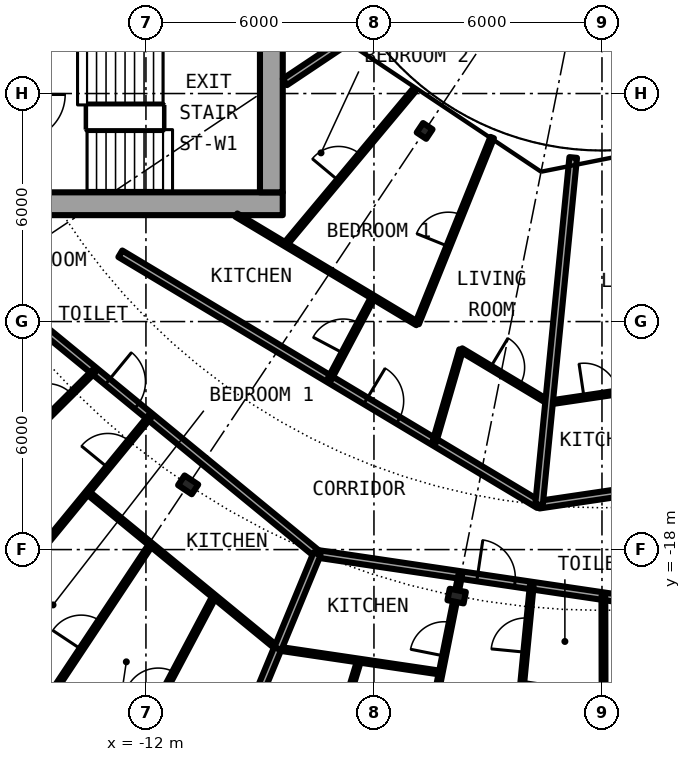
"""IFC4 building model, lengths in metres.
Left out: names, types, materials, properties, quantities, classifications, styles, units other than length and angle.
Written with IfcOpenShell. Run it as: python <this file> out.ifc"""

import sys

from ifc_helpers import new_model, si_unit, direction, frame, frame_2d, origin, origin_2d, place, context, subcontext, project, spatial, rectangle, i_section, extrude, element, fill, save


model = new_model("IFC4")
c1 = context("Model", 3, precision=1e-05, world=origin(), true_north=direction((0.0, 1.0)))
c2 = subcontext(c1, "Body", "Model", "MODEL_VIEW")
j1 = project(units=[si_unit("LENGTHUNIT", "METRE"), si_unit("PLANEANGLEUNIT", "RADIAN")], contexts=[c1])
p1 = place(None, origin())
s1 = spatial("IfcSite", under=j1, at=p1, CompositionType="ELEMENT")
p2 = place(p1, origin())
s2 = spatial("IfcBuilding", under=s1, at=p2, CompositionType="ELEMENT")
p3 = place(p2, frame((0.0, 0.0, 129.95)))
s3 = spatial("IfcBuildingStorey", under=s2, at=p3, CompositionType="ELEMENT", Elevation=129.95)
for number, where, z_axis, x_axis in (
    (1, (-10.889, -16.297, 0.0), (0.0, 0.0, 1.0), (-0.556, -0.831, 0.0)),
    (2, (-3.824, -19.223, 0.0), (0.0, 0.0, 1.0), (-0.195, -0.981, 0.0)),
):
    element("IfcColumn", number, at=place(p3, frame(where, z_axis=z_axis, x_axis=x_axis)), inside=s3, PredefinedType="COLUMN", context=c2, shape_type="SweptSolid", body=[
        extrude(i_section(OverallWidth=0.307, OverallDepth=0.432, WebThickness=0.021, FlangeThickness=0.04, FilletRadius=0.027, at=origin_2d()), origin(), (0.0, 0.0, 1.0), 3.05),
    ])
p4 = place(p3, frame((-4.667, -6.984, 0.0), z_axis=(0.0, 0.0, 1.0), x_axis=(-0.55557023302, -0.831469612303, 0.0)))
e3 = element("IfcColumn", 3, at=p4, inside=s3, PredefinedType="COLUMN", context=c2, shape_type="SweptSolid", body=[
    extrude(i_section(OverallWidth=0.3, OverallDepth=0.3, WebThickness=0.011, FlangeThickness=0.019, FilletRadius=0.027, at=origin_2d()), origin(), (0.0, 0.0, 1.0), 3.05),
])
p5 = place(p3, frame((-22.2, -8.9, 0.0), z_axis=(0.0, 0.0, 1.0), x_axis=(1.0, 0.0, 0.0)))
e4 = element("IfcWall", 4, at=p5, inside=s3, PredefinedType="SHEAR", context=c2, shape_type="SweptSolid", body=[
    extrude(rectangle(XDim=13.8, YDim=0.6, at=frame_2d((6.9, 0.0))), origin(), (0.0, 0.0, 1.0), 3.05),
])
p6 = place(p5, frame((1.125, 0.0, 0.0)))
e5 = element("IfcOpeningElement", 5, at=p6, cuts=e4, PredefinedType="OPENING", context=c2, shape_type="SweptSolid", body=[
    extrude(rectangle(XDim=1.2, YDim=2.3, at=frame_2d((0.6, 1.15))), frame((0.0, 0.31, 0.0), z_axis=(0.0, -1.0, 0.0), x_axis=(1.0, 0.0, 0.0)), (0.0, 0.0, 1.0), 0.62),
])
p7 = place(p3, frame((-8.7, 8.6, 0.0), z_axis=(0.0, 0.0, 1.0), x_axis=(0.0, -1.0, 0.0)))
e6 = element("IfcWall", 6, at=p7, inside=s3, PredefinedType="SHEAR", context=c2, shape_type="SweptSolid", body=[
    extrude(rectangle(XDim=17.2, YDim=0.6, at=frame_2d((8.6, 0.0))), origin(), (0.0, 0.0, 1.0), 3.05),
])
p8 = place(p7, frame((7.4, 0.0, 0.1)))
e7 = element("IfcOpeningElement", 7, at=p8, cuts=e6, PredefinedType="OPENING", context=c2, shape_type="SweptSolid", body=[
    extrude(rectangle(XDim=2.4, YDim=2.2, at=frame_2d((1.2, 1.1))), frame((0.0, 0.31, 0.0), z_axis=(0.0, -1.0, 0.0), x_axis=(1.0, 0.0, 0.0)), (0.0, 0.0, 1.0), 0.62),
])
p9 = place(p3, frame((-8.534, -20.603, 0.0), z_axis=(0.0, 0.0, 1.0), x_axis=(0.989178348771, -0.146718077695, 0.0)))
e8 = element("IfcWall", 8, at=p9, inside=s3, PredefinedType="PARTITIONING", context=c2, shape_type="SweptSolid", body=[
    extrude(rectangle(XDim=4.335, YDim=0.1, at=frame_2d((2.167, 0.0))), origin(), (0.0, 0.0, 1.0), 2.7),
])
p10 = place(p3, frame((-13.538, -16.496, 0.0), z_axis=(0.0, 0.0, 1.0), x_axis=(0.773000340237, -0.634405606843, 0.0)))
e9 = element("IfcWall", 9, at=p10, inside=s3, PredefinedType="PARTITIONING", context=c2, shape_type="SweptSolid", body=[
    extrude(rectangle(XDim=6.474, YDim=0.1, at=frame_2d((3.237, 0.0))), origin(), (0.0, 0.0, 1.0), 2.7),
])
p11 = place(p3, frame((-7.495, -18.111, 0.0), z_axis=(0.0, 0.0, 1.0), x_axis=(0.989215286911, -0.146468823102, 0.0)))
e10 = element("IfcWall", 10, at=p11, inside=s3, PredefinedType="PARTITIONING", context=c2, shape_type="SweptSolid", body=[
    extrude(rectangle(XDim=9.531, YDim=0.2, at=frame_2d((4.766, 0.0))), origin(), (0.0, 0.0, 1.0), 2.39),
])
p12 = place(p11, frame((4.26, 0.0, 0.0)))
e11 = element("IfcOpeningElement", 11, at=p12, cuts=e10, PredefinedType="OPENING", context=c2, shape_type="SweptSolid", body=[
    extrude(rectangle(XDim=1.0, YDim=2.3, at=frame_2d((0.5, 1.15))), frame((0.0, 0.11, 0.0), z_axis=(0.0, -1.0, 0.0), x_axis=(1.0, 0.0, 0.0)), (0.0, 0.0, 1.0), 0.22),
])
p13 = place(p3, frame((-16.173, -10.991, 0.0), z_axis=(0.0, 0.0, 1.0), x_axis=(0.773013989296, -0.634388975591, 0.0)))
e12 = element("IfcWall", 12, at=p13, inside=s3, PredefinedType="PARTITIONING", context=c2, shape_type="SweptSolid", body=[
    extrude(rectangle(XDim=11.219, YDim=0.2, at=frame_2d((5.609, 0.0))), origin(), (0.0, 0.0, 1.0), 2.39),
])
p14 = place(p13, frame((4.089, 0.0, 0.0)))
e13 = element("IfcOpeningElement", 13, at=p14, cuts=e12, PredefinedType="OPENING", context=c2, shape_type="SweptSolid", body=[
    extrude(rectangle(XDim=1.0, YDim=2.3, at=frame_2d((0.5, 1.15))), frame((0.0, 0.11, 0.0), z_axis=(0.0, -1.0, 0.0), x_axis=(1.0, 0.0, 0.0)), (0.0, 0.0, 1.0), 0.22),
])
p15 = place(p3, frame((-1.658, -16.819, 0.0), z_axis=(0.0, 0.0, 1.0), x_axis=(0.989191327347, 0.146630549004, 0.0)))
e14 = element("IfcWall", 14, at=p15, inside=s3, PredefinedType="PARTITIONING", context=c2, shape_type="SweptSolid", body=[
    extrude(rectangle(XDim=8.212, YDim=0.2, at=frame_2d((4.106, 0.0))), origin(), (0.0, 0.0, 1.0), 2.7),
])
p16 = place(p15, frame((3.607, 0.0, 0.0)))
e15 = element("IfcOpeningElement", 15, at=p16, cuts=e14, PredefinedType="OPENING", context=c2, shape_type="SweptSolid", body=[
    extrude(rectangle(XDim=1.0, YDim=2.3, at=frame_2d((0.5, 1.15))), frame((0.0, 0.11, 0.0), z_axis=(0.0, -1.0, 0.0), x_axis=(1.0, 0.0, 0.0)), (0.0, 0.0, 1.0), 0.22),
])
p17 = place(p3, frame((-12.674, -10.216, 0.0), z_axis=(0.0, 0.0, 1.0), x_axis=(0.857761135463, -0.514048474844, 0.0)))
e16 = element("IfcWall", 16, at=p17, inside=s3, PredefinedType="PARTITIONING", context=c2, shape_type="SweptSolid", body=[
    extrude(rectangle(XDim=12.845, YDim=0.2, at=frame_2d((6.423, 0.0))), origin(), (0.0, 0.0, 1.0), 2.7),
])
p18 = place(p17, frame((7.527, 0.0, 0.0)))
e17 = element("IfcOpeningElement", 17, at=p18, cuts=e16, PredefinedType="OPENING", context=c2, shape_type="SweptSolid", body=[
    extrude(rectangle(XDim=1.0, YDim=2.3, at=frame_2d((0.5, 1.15))), frame((0.0, 0.11, 0.0), z_axis=(0.0, -1.0, 0.0), x_axis=(1.0, 0.0, 0.0)), (0.0, 0.0, 1.0), 0.22),
])
p19 = place(p3, frame((-1.392, -14.132, 0.0), z_axis=(0.0, 0.0, 1.0), x_axis=(0.989182088026, 0.146692865293, 0.0)))
e18 = element("IfcWall", 18, at=p19, inside=s3, PredefinedType="PARTITIONING", context=c2, shape_type="SweptSolid", body=[
    extrude(rectangle(XDim=2.761, YDim=0.1, at=frame_2d((1.38, 0.0))), origin(), (0.0, 0.0, 1.0), 2.7),
])
p20 = place(p19, frame((0.93, 0.0, 0.0)))
e19 = element("IfcOpeningElement", 19, at=p20, cuts=e18, PredefinedType="OPENING", context=c2, shape_type="SweptSolid", body=[
    extrude(rectangle(XDim=0.9, YDim=2.3, at=frame_2d((0.45, 1.15))), frame((0.0, 0.06, 0.0), z_axis=(0.0, -1.0, 0.0), x_axis=(1.0, 0.0, 0.0)), (0.0, 0.0, 1.0), 0.12),
])
p21 = place(p3, frame((-9.621, -9.199, 0.0), z_axis=(0.0, 0.0, 1.0), x_axis=(0.857698539053, -0.514152911211, 0.0)))
e20 = element("IfcWall", 20, at=p21, inside=s3, PredefinedType="PARTITIONING", context=c2, shape_type="SweptSolid", body=[
    extrude(rectangle(XDim=5.551, YDim=0.1, at=frame_2d((2.775, 0.0))), origin(), (0.0, 0.0, 1.0), 2.7),
])
p22 = place(p3, frame((-3.702, -12.747, 0.0), z_axis=(0.0, 0.0, 1.0), x_axis=(0.85772440305, -0.514109763001, 0.0)))
e21 = element("IfcWall", 21, at=p22, inside=s3, PredefinedType="PARTITIONING", context=c2, shape_type="SweptSolid", body=[
    extrude(rectangle(XDim=2.698, YDim=0.1, at=frame_2d((1.349, 0.0))), origin(), (0.0, 0.0, 1.0), 2.7),
])
p23 = place(p22, frame((0.894, 0.0, 0.0)))
e22 = element("IfcOpeningElement", 22, at=p23, cuts=e21, PredefinedType="OPENING", context=c2, shape_type="SweptSolid", body=[
    extrude(rectangle(XDim=0.9, YDim=2.3, at=frame_2d((0.45, 1.15))), frame((0.0, 0.06, 0.0), z_axis=(0.0, -1.0, 0.0), x_axis=(1.0, 0.0, 0.0)), (0.0, 0.0, 1.0), 0.12),
])
p24 = place(p3, frame((-6.513, -4.472, 0.0), z_axis=(0.0, 0.0, 1.0), x_axis=(-0.831333375071, -0.555774072347, 0.0)))
e23 = element("IfcWall", 23, at=p24, inside=s3, PredefinedType="PARTITIONING", context=c2, shape_type="SweptSolid", body=[
    extrude(rectangle(XDim=2.203, YDim=0.2, at=frame_2d((1.101, 0.0))), origin(), (0.0, 0.0, 1.0), 2.7),
])
p25 = place(p3, frame((-17.24, -21.007, 0.0), z_axis=(0.0, 0.0, 1.0), x_axis=(0.634396151441, 0.77300810024, 0.0)))
e24 = element("IfcWall", 24, at=p25, inside=s3, PredefinedType="PARTITIONING", context=c2, shape_type="SweptSolid", body=[
    extrude(rectangle(XDim=8.419, YDim=0.1, at=frame_2d((4.209, 0.0))), origin(), (0.0, 0.0, 1.0), 2.7),
])
p26 = place(p25, frame((6.679, 0.0, 0.0)))
e25 = element("IfcOpeningElement", 25, at=p26, cuts=e24, PredefinedType="OPENING", context=c2, shape_type="SweptSolid", body=[
    extrude(rectangle(XDim=0.9, YDim=2.3, at=frame_2d((0.45, 1.15))), frame((0.0, 0.06, 0.0), z_axis=(0.0, -1.0, 0.0), x_axis=(1.0, 0.0, 0.0)), (0.0, 0.0, 1.0), 0.12),
])
p27 = place(p25, frame((2.468, 0.0, 0.0)))
e26 = element("IfcOpeningElement", 26, at=p27, cuts=e24, PredefinedType="OPENING", context=c2, shape_type="SweptSolid", body=[
    extrude(rectangle(XDim=0.9, YDim=2.3, at=frame_2d((0.45, 1.15))), frame((0.0, 0.06, 0.0), z_axis=(0.0, -1.0, 0.0), x_axis=(1.0, 0.0, 0.0)), (0.0, 0.0, 1.0), 0.12),
])
p28 = place(p3, frame((-15.202, -15.131, 0.0), z_axis=(0.0, 0.0, 1.0), x_axis=(0.708796844581, 0.705412668665, 0.0)))
e27 = element("IfcWall", 27, at=p28, inside=s3, PredefinedType="PARTITIONING", context=c2, shape_type="SweptSolid", body=[
    extrude(rectangle(XDim=2.597, YDim=0.1, at=frame_2d((1.299, 0.0))), origin(), (0.0, 0.0, 1.0), 2.7),
])
p29 = place(p28, frame((0.849, 0.0, 0.0)))
e28 = element("IfcOpeningElement", 28, at=p29, cuts=e27, PredefinedType="OPENING", context=c2, shape_type="SweptSolid", body=[
    extrude(rectangle(XDim=0.9, YDim=2.3, at=frame_2d((0.45, 1.15))), frame((0.0, 0.06, 0.0), z_axis=(0.0, -1.0, 0.0), x_axis=(1.0, 0.0, 0.0)), (0.0, 0.0, 1.0), 0.12),
])
p30 = place(p3, frame((-15.039, -22.634, 0.0), z_axis=(0.0, 0.0, 1.0), x_axis=(0.553440102418, 0.832888980018, 0.0)))
e29 = element("IfcWall", 29, at=p30, inside=s3, PredefinedType="PARTITIONING", context=c2, shape_type="SweptSolid", body=[
    extrude(rectangle(XDim=5.726, YDim=0.1, at=frame_2d((2.863, 0.0))), origin(), (0.0, 0.0, 1.0), 2.7),
])
p31 = place(p30, frame((2.413, 0.0, 0.0)))
e30 = element("IfcOpeningElement", 30, at=p31, cuts=e29, PredefinedType="OPENING", context=c2, shape_type="SweptSolid", body=[
    extrude(rectangle(XDim=0.9, YDim=2.3, at=frame_2d((0.45, 1.15))), frame((0.0, 0.06, 0.0), z_axis=(0.0, -1.0, 0.0), x_axis=(1.0, 0.0, 0.0)), (0.0, 0.0, 1.0), 0.12),
])
p32 = place(p3, frame((-12.734, -24.007, 0.0), z_axis=(0.0, 0.0, 1.0), x_axis=(0.468610030042, 0.883405139075, 0.0)))
e31 = element("IfcWall", 31, at=p32, inside=s3, PredefinedType="PARTITIONING", context=c2, shape_type="SweptSolid", body=[
    extrude(rectangle(XDim=5.403, YDim=0.1, at=frame_2d((2.702, 0.0))), origin(), (0.0, 0.0, 1.0), 2.7),
])
p33 = place(p32, frame((2.252, 0.0, 0.0)))
e32 = element("IfcOpeningElement", 32, at=p33, cuts=e31, PredefinedType="OPENING", context=c2, shape_type="SweptSolid", body=[
    extrude(rectangle(XDim=0.9, YDim=2.3, at=frame_2d((0.45, 1.15))), frame((0.0, 0.06, 0.0), z_axis=(0.0, -1.0, 0.0), x_axis=(1.0, 0.0, 0.0)), (0.0, 0.0, 1.0), 0.12),
])
p34 = place(p3, frame((-10.399, -25.106, 0.0), z_axis=(0.0, 0.0, 1.0), x_axis=(0.382651153718, 0.923892902104, 0.0)))
e33 = element("IfcWall", 33, at=p34, inside=s3, PredefinedType="PARTITIONING", context=c2, shape_type="SweptSolid", body=[
    extrude(rectangle(XDim=4.874, YDim=0.2, at=frame_2d((2.437, 0.0))), origin(), (0.0, 0.0, 1.0), 2.7),
])
p35 = place(p3, frame((-8.529, -20.605, 0.0), z_axis=(0.0, 0.0, 1.0), x_axis=(0.382540781694, 0.923938607452, 0.0)))
e34 = element("IfcWall", 34, at=p35, inside=s3, PredefinedType="PARTITIONING", context=c2, shape_type="SweptSolid", body=[
    extrude(rectangle(XDim=2.7, YDim=0.2, at=frame_2d((1.35, 0.0))), origin(), (0.0, 0.0, 1.0), 2.7),
])
p36 = place(p3, frame((-8.335, -9.97, 0.0), z_axis=(0.0, 0.0, 1.0), x_axis=(0.641376424834, 0.767226356213, 0.0)))
e35 = element("IfcWall", 35, at=p36, inside=s3, PredefinedType="PARTITIONING", context=c2, shape_type="SweptSolid", body=[
    extrude(rectangle(XDim=5.275, YDim=0.1, at=frame_2d((2.637, 0.0))), origin(), (0.0, 0.0, 1.0), 2.7),
])
p37 = place(p36, frame((2.187, 0.0, 0.0)))
e36 = element("IfcOpeningElement", 36, at=p37, cuts=e35, PredefinedType="OPENING", context=c2, shape_type="SweptSolid", body=[
    extrude(rectangle(XDim=0.9, YDim=2.3, at=frame_2d((0.45, 1.15))), frame((0.0, 0.06, 0.0), z_axis=(0.0, -1.0, 0.0), x_axis=(1.0, 0.0, 0.0)), (0.0, 0.0, 1.0), 0.12),
])
p38 = place(p3, frame((-7.938, -25.99, 0.0), z_axis=(0.0, 0.0, 1.0), x_axis=(0.292081613207, 0.956393397732, 0.0)))
e37 = element("IfcWall", 37, at=p38, inside=s3, PredefinedType="PARTITIONING", context=c2, shape_type="SweptSolid", body=[
    extrude(rectangle(XDim=5.3, YDim=0.1, at=frame_2d((2.65, 0.0))), origin(), (0.0, 0.0, 1.0), 2.7),
])
p39 = place(p38, frame((2.2, 0.0, 0.0)))
e38 = element("IfcOpeningElement", 38, at=p39, cuts=e37, PredefinedType="OPENING", context=c2, shape_type="SweptSolid", body=[
    extrude(rectangle(XDim=0.9, YDim=2.3, at=frame_2d((0.45, 1.15))), frame((0.0, 0.06, 0.0), z_axis=(0.0, -1.0, 0.0), x_axis=(1.0, 0.0, 0.0)), (0.0, 0.0, 1.0), 0.12),
])
p40 = place(p3, frame((-7.169, -13.516, 0.0), z_axis=(0.0, 0.0, 1.0), x_axis=(0.468649029236, 0.883384450506, 0.0)))
e39 = element("IfcWall", 39, at=p40, inside=s3, PredefinedType="PARTITIONING", context=c2, shape_type="SweptSolid", body=[
    extrude(rectangle(XDim=2.445, YDim=0.1, at=frame_2d((1.223, 0.0))), origin(), (0.0, 0.0, 1.0), 2.7),
])
p41 = place(p40, frame((0.773, 0.0, 0.0)))
e40 = element("IfcOpeningElement", 40, at=p41, cuts=e39, PredefinedType="OPENING", context=c2, shape_type="SweptSolid", body=[
    extrude(rectangle(XDim=0.9, YDim=2.3, at=frame_2d((0.45, 1.15))), frame((0.0, 0.06, 0.0), z_axis=(0.0, -1.0, 0.0), x_axis=(1.0, 0.0, 0.0)), (0.0, 0.0, 1.0), 0.12),
])
p42 = place(p3, frame((-5.324, -26.649, 0.0), z_axis=(0.0, 0.0, 1.0), x_axis=(0.195918370415, 0.980620207896, 0.0)))
e41 = element("IfcWall", 41, at=p42, inside=s3, PredefinedType="PARTITIONING", context=c2, shape_type="SweptSolid", body=[
    extrude(rectangle(XDim=7.36, YDim=0.1, at=frame_2d((3.68, 0.0))), origin(), (0.0, 0.0, 1.0), 2.7),
])
p43 = place(p42, frame((5.966, 0.0, 0.0)))
e42 = element("IfcOpeningElement", 42, at=p43, cuts=e41, PredefinedType="OPENING", context=c2, shape_type="SweptSolid", body=[
    extrude(rectangle(XDim=0.9, YDim=2.3, at=frame_2d((0.45, 1.15))), frame((0.0, 0.06, 0.0), z_axis=(0.0, -1.0, 0.0), x_axis=(1.0, 0.0, 0.0)), (0.0, 0.0, 1.0), 0.12),
])
p44 = place(p42, frame((2.308, 0.0, 0.0)))
e43 = element("IfcOpeningElement", 43, at=p44, cuts=e41, PredefinedType="OPENING", context=c2, shape_type="SweptSolid", body=[
    extrude(rectangle(XDim=0.9, YDim=2.3, at=frame_2d((0.45, 1.15))), frame((0.0, 0.06, 0.0), z_axis=(0.0, -1.0, 0.0), x_axis=(1.0, 0.0, 0.0)), (0.0, 0.0, 1.0), 0.12),
])
p45 = place(p3, frame((-4.864, -12.051, 0.0), z_axis=(0.0, 0.0, 1.0), x_axis=(0.374372761824, 0.927278294367, 0.0)))
e44 = element("IfcWall", 44, at=p45, inside=s3, PredefinedType="PARTITIONING", context=c2, shape_type="SweptSolid", body=[
    extrude(rectangle(XDim=5.276, YDim=0.1, at=frame_2d((2.638, 0.0))), origin(), (0.0, 0.0, 1.0), 2.7),
])
p46 = place(p45, frame((2.188, 0.0, 0.0)))
e45 = element("IfcOpeningElement", 45, at=p46, cuts=e44, PredefinedType="OPENING", context=c2, shape_type="SweptSolid", body=[
    extrude(rectangle(XDim=0.9, YDim=2.3, at=frame_2d((0.45, 1.15))), frame((0.0, 0.06, 0.0), z_axis=(0.0, -1.0, 0.0), x_axis=(1.0, 0.0, 0.0)), (0.0, 0.0, 1.0), 0.12),
])
p47 = place(p3, frame((-4.411, -15.168, 0.0), z_axis=(0.0, 0.0, 1.0), x_axis=(0.279201466266, 0.960232545395, 0.0)))
e46 = element("IfcWall", 46, at=p47, inside=s3, PredefinedType="PARTITIONING", context=c2, shape_type="SweptSolid", body=[
    extrude(rectangle(XDim=2.524, YDim=0.1, at=frame_2d((1.262, 0.0))), origin(), (0.0, 0.0, 1.0), 2.7),
])
p48 = place(p3, frame((-3.797, -19.008, 0.0), z_axis=(0.0, 0.0, 1.0), x_axis=(0.196386856719, 0.980526492507, 0.0)))
e47 = element("IfcWall", 47, at=p48, inside=s3, PredefinedType="PARTITIONING", context=c2, shape_type="SweptSolid", body=[
    extrude(rectangle(XDim=0.347, YDim=0.1, at=frame_2d((0.173, 0.0))), origin(), (0.0, 0.0, 1.0), 2.7),
])
p49 = place(p3, frame((-2.102, -21.557, 0.0), z_axis=(0.0, 0.0, 1.0), x_axis=(0.096922256818, 0.995291955224, 0.0)))
e48 = element("IfcWall", 48, at=p49, inside=s3, PredefinedType="PARTITIONING", context=c2, shape_type="SweptSolid", body=[
    extrude(rectangle(XDim=2.622, YDim=0.1, at=frame_2d((1.311, 0.0))), origin(), (0.0, 0.0, 1.0), 2.7),
])
p50 = place(p49, frame((0.861, 0.0, 0.0)))
e49 = element("IfcOpeningElement", 49, at=p50, cuts=e48, PredefinedType="OPENING", context=c2, shape_type="SweptSolid", body=[
    extrude(rectangle(XDim=0.9, YDim=2.3, at=frame_2d((0.45, 1.15))), frame((0.0, 0.06, 0.0), z_axis=(0.0, -1.0, 0.0), x_axis=(1.0, 0.0, 0.0)), (0.0, 0.0, 1.0), 0.12),
])
p51 = place(p3, frame((-1.657, -16.819, 0.0), z_axis=(0.0, 0.0, 1.0), x_axis=(0.098026443043, 0.995183810391, 0.0)))
e50 = element("IfcWall", 50, at=p51, inside=s3, PredefinedType="PARTITIONING", context=c2, shape_type="SweptSolid", body=[
    extrude(rectangle(XDim=9.18, YDim=0.2, at=frame_2d((4.59, 0.0))), origin(), (0.0, 0.0, 1.0), 2.7),
])
p52 = place(p3, frame((0.042, -21.875, 0.0), z_axis=(0.0, 0.0, 1.0), x_axis=(-0.001843314841, 0.999998301094, 0.0)))
e51 = element("IfcWall", 51, at=p52, inside=s3, PredefinedType="PARTITIONING", context=c2, shape_type="SweptSolid", body=[
    extrude(rectangle(XDim=2.649, YDim=0.1, at=frame_2d((1.324, 0.0))), origin(), (0.0, 0.0, 1.0), 2.7),
])
p53 = place(p14, origin())
e52 = element("IfcDoor", 52, at=p53, inside=s3, OperationType="SINGLE_SWING_LEFT", PredefinedType="DOOR", context=c2, shape_type="SweptSolid", body=[
    extrude(rectangle(XDim=1.0, YDim=2.3, at=frame_2d((0.5, 1.15))), frame((0.0, 0.025, 0.0), z_axis=(0.0, -1.0, 0.0), x_axis=(1.0, 0.0, 0.0)), (0.0, 0.0, 1.0), 0.05),
])
fill(e13, e52)
p54 = place(p29, origin())
e53 = element("IfcDoor", 53, at=p54, inside=s3, OperationType="SINGLE_SWING_LEFT", PredefinedType="DOOR", context=c2, shape_type="SweptSolid", body=[
    extrude(rectangle(XDim=0.9, YDim=2.3, at=frame_2d((0.45, 1.15))), frame((0.0, 0.025, 0.0), z_axis=(0.0, -1.0, 0.0), x_axis=(1.0, 0.0, 0.0)), (0.0, 0.0, 1.0), 0.05),
])
fill(e28, e53)
p55 = place(p26, origin())
e54 = element("IfcDoor", 54, at=p55, inside=s3, OperationType="SINGLE_SWING_RIGHT", PredefinedType="DOOR", context=c2, shape_type="SweptSolid", body=[
    extrude(rectangle(XDim=0.9, YDim=2.3, at=frame_2d((0.45, 1.15))), frame((0.0, 0.025, 0.0), z_axis=(0.0, -1.0, 0.0), x_axis=(1.0, 0.0, 0.0)), (0.0, 0.0, 1.0), 0.05),
])
fill(e25, e54)
p56 = place(p31, origin())
e55 = element("IfcDoor", 55, at=p56, inside=s3, OperationType="SINGLE_SWING_RIGHT", PredefinedType="DOOR", context=c2, shape_type="SweptSolid", body=[
    extrude(rectangle(XDim=0.9, YDim=2.3, at=frame_2d((0.45, 1.15))), frame((0.0, 0.025, 0.0), z_axis=(0.0, -1.0, 0.0), x_axis=(1.0, 0.0, 0.0)), (0.0, 0.0, 1.0), 0.05),
])
fill(e30, e55)
p57 = place(p33, origin())
e56 = element("IfcDoor", 56, at=p57, inside=s3, OperationType="SINGLE_SWING_LEFT", PredefinedType="DOOR", context=c2, shape_type="SweptSolid", body=[
    extrude(rectangle(XDim=0.9, YDim=2.3, at=frame_2d((0.45, 1.15))), frame((0.0, 0.025, 0.0), z_axis=(0.0, -1.0, 0.0), x_axis=(1.0, 0.0, 0.0)), (0.0, 0.0, 1.0), 0.05),
])
fill(e32, e56)
p58 = place(p12, origin())
e57 = element("IfcDoor", 57, at=p58, inside=s3, OperationType="SINGLE_SWING_LEFT", PredefinedType="DOOR", context=c2, shape_type="SweptSolid", body=[
    extrude(rectangle(XDim=1.0, YDim=2.3, at=frame_2d((0.5, 1.15))), frame((0.0, 0.025, 0.0), z_axis=(0.0, -1.0, 0.0), x_axis=(1.0, 0.0, 0.0)), (0.0, 0.0, 1.0), 0.05),
])
fill(e11, e57)
p59 = place(p50, origin())
e58 = element("IfcDoor", 58, at=p59, inside=s3, OperationType="SINGLE_SWING_LEFT", PredefinedType="DOOR", context=c2, shape_type="SweptSolid", body=[
    extrude(rectangle(XDim=0.9, YDim=2.3, at=frame_2d((0.45, 1.15))), frame((0.0, 0.025, 0.0), z_axis=(0.0, -1.0, 0.0), x_axis=(1.0, 0.0, 0.0)), (0.0, 0.0, 1.0), 0.05),
])
fill(e49, e58)
p60 = place(p43, origin())
e59 = element("IfcDoor", 59, at=p60, inside=s3, OperationType="SINGLE_SWING_RIGHT", PredefinedType="DOOR", context=c2, shape_type="SweptSolid", body=[
    extrude(rectangle(XDim=0.9, YDim=2.3, at=frame_2d((0.45, 1.15))), frame((0.0, 0.025, 0.0), z_axis=(0.0, -1.0, 0.0), x_axis=(1.0, 0.0, 0.0)), (0.0, 0.0, 1.0), 0.05),
])
fill(e42, e59)
p61 = place(p18, origin())
e60 = element("IfcDoor", 60, at=p61, inside=s3, OperationType="SINGLE_SWING_RIGHT", PredefinedType="DOOR", context=c2, shape_type="SweptSolid", body=[
    extrude(rectangle(XDim=1.0, YDim=2.3, at=frame_2d((0.5, 1.15))), frame((0.0, 0.025, 0.0), z_axis=(0.0, -1.0, 0.0), x_axis=(1.0, 0.0, 0.0)), (0.0, 0.0, 1.0), 0.05),
])
fill(e17, e60)
p62 = place(p23, origin())
e61 = element("IfcDoor", 61, at=p62, inside=s3, OperationType="SINGLE_SWING_LEFT", PredefinedType="DOOR", context=c2, shape_type="SweptSolid", body=[
    extrude(rectangle(XDim=0.9, YDim=2.3, at=frame_2d((0.45, 1.15))), frame((0.0, 0.025, 0.0), z_axis=(0.0, -1.0, 0.0), x_axis=(1.0, 0.0, 0.0)), (0.0, 0.0, 1.0), 0.05),
])
fill(e22, e61)
p63 = place(p41, origin())
e62 = element("IfcDoor", 62, at=p63, inside=s3, OperationType="SINGLE_SWING_RIGHT", PredefinedType="DOOR", context=c2, shape_type="SweptSolid", body=[
    extrude(rectangle(XDim=0.9, YDim=2.3, at=frame_2d((0.45, 1.15))), frame((0.0, 0.025, 0.0), z_axis=(0.0, -1.0, 0.0), x_axis=(1.0, 0.0, 0.0)), (0.0, 0.0, 1.0), 0.05),
])
fill(e40, e62)
p64 = place(p46, origin())
e63 = element("IfcDoor", 63, at=p64, inside=s3, OperationType="SINGLE_SWING_RIGHT", PredefinedType="DOOR", context=c2, shape_type="SweptSolid", body=[
    extrude(rectangle(XDim=0.9, YDim=2.3, at=frame_2d((0.45, 1.15))), frame((0.0, 0.025, 0.0), z_axis=(0.0, -1.0, 0.0), x_axis=(1.0, 0.0, 0.0)), (0.0, 0.0, 1.0), 0.05),
])
fill(e45, e63)
p65 = place(p37, origin())
e64 = element("IfcDoor", 64, at=p65, inside=s3, OperationType="SINGLE_SWING_RIGHT", PredefinedType="DOOR", context=c2, shape_type="SweptSolid", body=[
    extrude(rectangle(XDim=0.9, YDim=2.3, at=frame_2d((0.45, 1.15))), frame((0.0, 0.025, 0.0), z_axis=(0.0, -1.0, 0.0), x_axis=(1.0, 0.0, 0.0)), (0.0, 0.0, 1.0), 0.05),
])
fill(e36, e64)
p66 = place(p20, origin())
e65 = element("IfcDoor", 65, at=p66, inside=s3, OperationType="SINGLE_SWING_LEFT", PredefinedType="DOOR", context=c2, shape_type="SweptSolid", body=[
    extrude(rectangle(XDim=0.9, YDim=2.3, at=frame_2d((0.45, 1.15))), frame((0.0, 0.025, 0.0), z_axis=(0.0, -1.0, 0.0), x_axis=(1.0, 0.0, 0.0)), (0.0, 0.0, 1.0), 0.05),
])
fill(e19, e65)
save(model, sys.argv[1])
